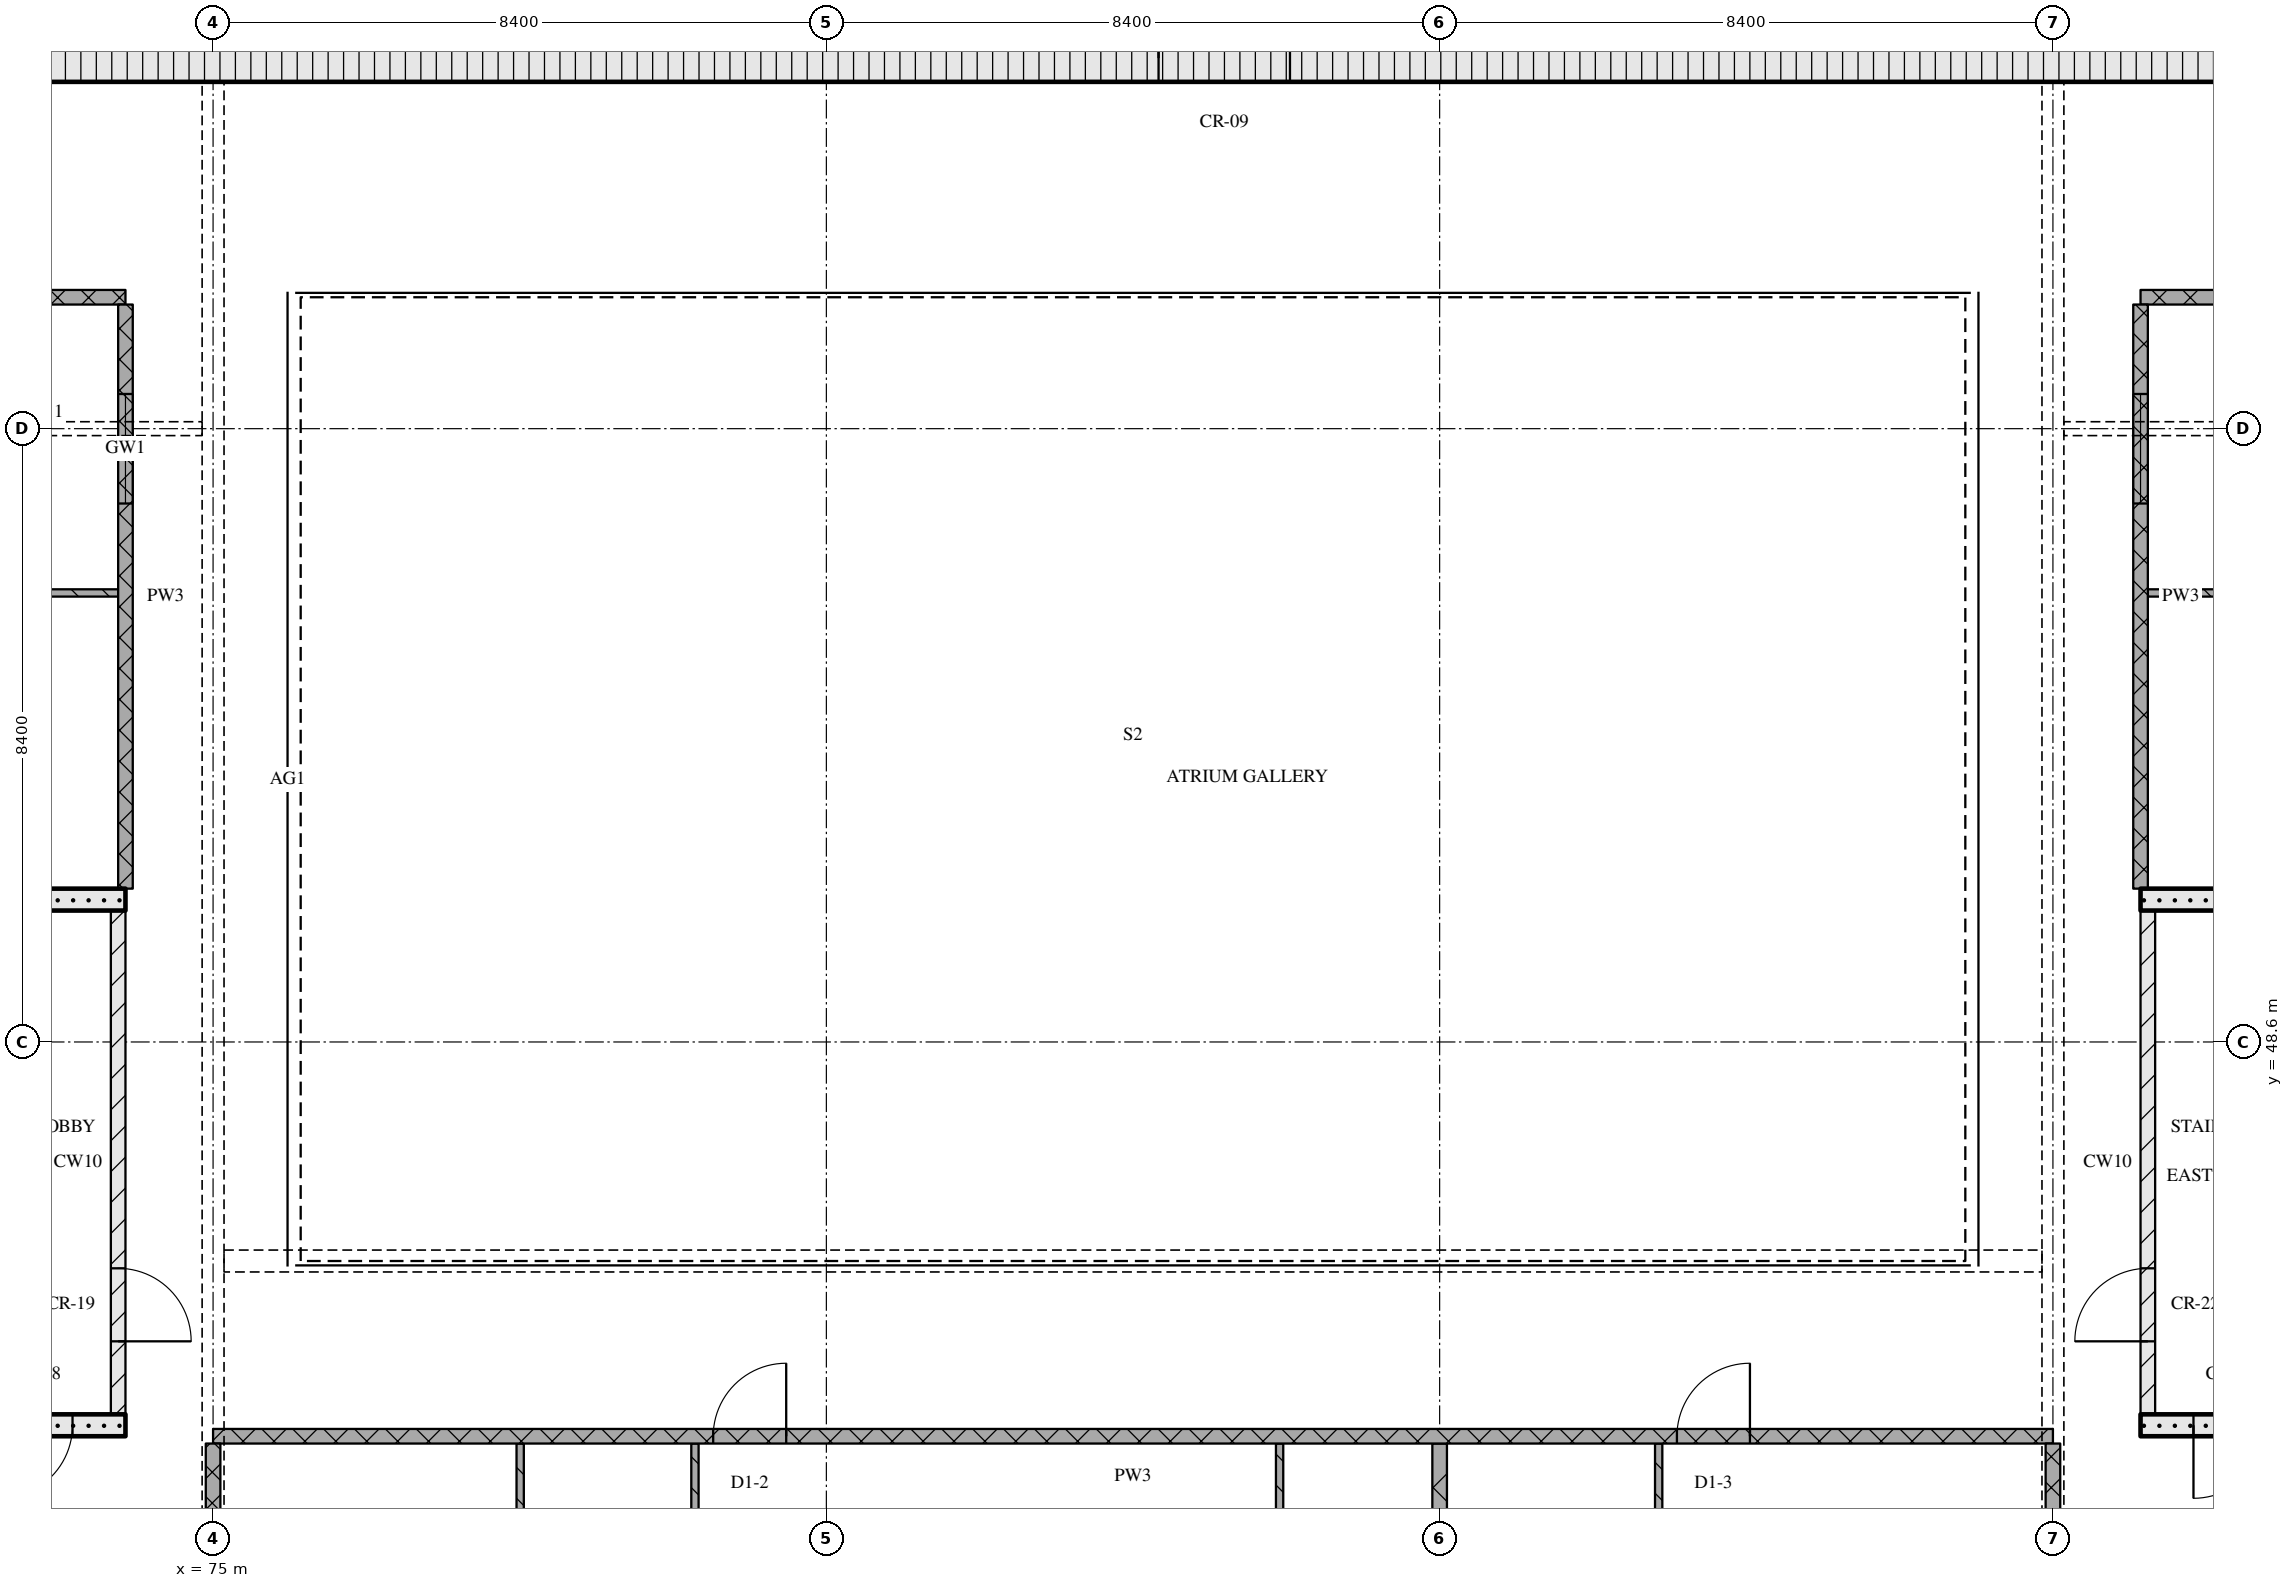
"""IFC4 building model, lengths in metres.
Left out: names, types, materials, properties, quantities, classifications, styles, units other than length and angle.
Written with IfcOpenShell. Run it as: python <this file> out.ifc"""

import sys

from ifc_helpers import new_model, si_unit, direction, frame, frame_2d, origin, place, context, subcontext, project, spatial, rectangle, extrude, element, fill, save


model = new_model("IFC4")
c1 = context("Model", 3, precision=1e-05, world=origin(), true_north=direction((0.0, 1.0)))
c2 = subcontext(c1, "Body", "Model", "MODEL_VIEW")
j1 = project(units=[si_unit("LENGTHUNIT", "METRE"), si_unit("PLANEANGLEUNIT", "RADIAN")], contexts=[c1])
p1 = place(None, origin())
s1 = spatial("IfcSite", under=j1, at=p1, CompositionType="ELEMENT")
p2 = place(p1, origin())
s2 = spatial("IfcBuilding", under=s1, at=p2, CompositionType="ELEMENT")
p3 = place(p2, frame((0.0, 0.0, 209.1)))
s3 = spatial("IfcBuildingStorey", under=s2, at=p3, CompositionType="ELEMENT", Elevation=209.1)
p4 = place(p3, frame((67.15, 62.075, 0.0), z_axis=(0.0, 0.0, 1.0), x_axis=(1.0, 0.0, 0.0)))
e1 = element("IfcWall", 1, at=p4, inside=s3, PredefinedType="SOLIDWALL", context=c2, shape_type="SweptSolid", body=[
    extrude(rectangle(XDim=40.9, YDim=0.65, at=frame_2d((20.45, 0.0))), origin(), (0.0, 0.0, 1.0), 3.32),
])
p5 = place(p4, frame((20.8, 0.0, 0.0)))
e2 = element("IfcOpeningElement", 2, at=p5, cuts=e1, PredefinedType="OPENING", context=c2, shape_type="SweptSolid", body=[
    extrude(rectangle(XDim=1.8, YDim=2.1, at=frame_2d((0.9, 1.05))), frame((0.0, 0.335, 0.0), z_axis=(0.0, -1.0, 0.0), x_axis=(1.0, 0.0, 0.0)), (0.0, 0.0, 1.0), 0.67),
])
p6 = place(p3, frame((68.2, 43.35, 0.0), z_axis=(0.0, 0.0, 1.0), x_axis=(1.0, 0.0, 0.0)))
e3 = element("IfcWall", 3, at=p6, inside=s3, PredefinedType="SOLIDWALL", context=c2, shape_type="SweptSolid", body=[
    extrude(rectangle(XDim=5.6, YDim=0.3, at=frame_2d((2.8, 0.0))), origin(), (0.0, 0.0, 1.0), 3.32),
])
p7 = place(p6, frame((3.875, 0.0, 0.0)))
e4 = element("IfcOpeningElement", 4, at=p7, cuts=e3, PredefinedType="OPENING", context=c2, shape_type="SweptSolid", body=[
    extrude(rectangle(XDim=1.0, YDim=2.1, at=frame_2d((0.5, 1.05))), frame((0.0, 0.16, 0.0), z_axis=(0.0, -1.0, 0.0), x_axis=(1.0, 0.0, 0.0)), (0.0, 0.0, 1.0), 0.32),
])
p8 = place(p3, frame((73.7, 43.5, 0.0), z_axis=(0.0, 0.0, 1.0), x_axis=(0.0, 1.0, 0.0)))
e5 = element("IfcWall", 5, at=p8, inside=s3, PredefinedType="PARTITIONING", context=c2, shape_type="SweptSolid", body=[
    extrude(rectangle(XDim=6.9, YDim=0.2, at=frame_2d((3.45, 0.0))), origin(), (0.0, 0.0, 1.0), 3.32),
])
p9 = place(p8, frame((1.0, 0.0, 0.0)))
e6 = element("IfcOpeningElement", 6, at=p9, cuts=e5, PredefinedType="OPENING", context=c2, shape_type="SweptSolid", body=[
    extrude(rectangle(XDim=1.0, YDim=2.1, at=frame_2d((0.5, 1.05))), frame((0.0, 0.11, 0.0), z_axis=(0.0, -1.0, 0.0), x_axis=(1.0, 0.0, 0.0)), (0.0, 0.0, 1.0), 0.22),
])
p10 = place(p3, frame((68.2, 50.55, 0.0), z_axis=(0.0, 0.0, 1.0), x_axis=(1.0, 0.0, 0.0)))
e7 = element("IfcWall", 7, at=p10, inside=s3, PredefinedType="SOLIDWALL", context=c2, shape_type="SweptSolid", body=[
    extrude(rectangle(XDim=5.6, YDim=0.3, at=frame_2d((2.8, 0.0))), origin(), (0.0, 0.0, 1.0), 3.32),
])
p11 = place(p3, frame((101.4, 43.35, 0.0), z_axis=(0.0, 0.0, 1.0), x_axis=(1.0, 0.0, 0.0)))
e8 = element("IfcWall", 8, at=p11, inside=s3, PredefinedType="SOLIDWALL", context=c2, shape_type="SweptSolid", body=[
    extrude(rectangle(XDim=5.6, YDim=0.3, at=frame_2d((2.8, 0.0))), origin(), (0.0, 0.0, 1.0), 3.32),
])
p12 = place(p11, frame((0.725, 0.0, 0.0)))
e9 = element("IfcOpeningElement", 9, at=p12, cuts=e8, PredefinedType="OPENING", context=c2, shape_type="SweptSolid", body=[
    extrude(rectangle(XDim=1.0, YDim=2.1, at=frame_2d((0.5, 1.05))), frame((0.0, 0.16, 0.0), z_axis=(0.0, -1.0, 0.0), x_axis=(1.0, 0.0, 0.0)), (0.0, 0.0, 1.0), 0.32),
])
p13 = place(p3, frame((101.5, 43.5, 0.0), z_axis=(0.0, 0.0, 1.0), x_axis=(0.0, 1.0, 0.0)))
e10 = element("IfcWall", 10, at=p13, inside=s3, PredefinedType="PARTITIONING", context=c2, shape_type="SweptSolid", body=[
    extrude(rectangle(XDim=6.9, YDim=0.2, at=frame_2d((3.45, 0.0))), origin(), (0.0, 0.0, 1.0), 3.32),
])
p14 = place(p13, frame((1.0, 0.0, 0.0)))
e11 = element("IfcOpeningElement", 11, at=p14, cuts=e10, PredefinedType="OPENING", context=c2, shape_type="SweptSolid", body=[
    extrude(rectangle(XDim=1.0, YDim=2.1, at=frame_2d((0.5, 1.05))), frame((0.0, 0.11, 0.0), z_axis=(0.0, -1.0, 0.0), x_axis=(1.0, 0.0, 0.0)), (0.0, 0.0, 1.0), 0.22),
])
p15 = place(p3, frame((101.4, 50.55, 0.0), z_axis=(0.0, 0.0, 1.0), x_axis=(1.0, 0.0, 0.0)))
e12 = element("IfcWall", 12, at=p15, inside=s3, PredefinedType="SOLIDWALL", context=c2, shape_type="SweptSolid", body=[
    extrude(rectangle(XDim=5.6, YDim=0.3, at=frame_2d((2.8, 0.0))), origin(), (0.0, 0.0, 1.0), 3.32),
])
p16 = place(p3, frame((100.2, 43.2, 0.0), z_axis=(0.0, 0.0, 1.0), x_axis=(-1.0, 0.0, 0.0)))
e13 = element("IfcWall", 13, at=p16, inside=s3, PredefinedType="PARTITIONING", context=c2, shape_type="SweptSolid", body=[
    extrude(rectangle(XDim=25.2, YDim=0.2, at=frame_2d((12.6, 0.0))), origin(), (0.0, 0.0, 1.0), 3.32),
])
p17 = place(p16, frame((4.15, 0.0, 0.0)))
e14 = element("IfcOpeningElement", 14, at=p17, cuts=e13, PredefinedType="OPENING", context=c2, shape_type="SweptSolid", body=[
    extrude(rectangle(XDim=1.0, YDim=2.1, at=frame_2d((0.5, 1.05))), frame((0.0, 0.11, 0.0), z_axis=(0.0, -1.0, 0.0), x_axis=(1.0, 0.0, 0.0)), (0.0, 0.0, 1.0), 0.22),
])
p18 = place(p16, frame((17.35, 0.0, 0.0)))
e15 = element("IfcOpeningElement", 15, at=p18, cuts=e13, PredefinedType="OPENING", context=c2, shape_type="SweptSolid", body=[
    extrude(rectangle(XDim=1.0, YDim=2.1, at=frame_2d((0.5, 1.05))), frame((0.0, 0.11, 0.0), z_axis=(0.0, -1.0, 0.0), x_axis=(1.0, 0.0, 0.0)), (0.0, 0.0, 1.0), 0.22),
])
p19 = place(p3, frame((69.3, 54.75, 0.0), z_axis=(0.0, 0.0, 1.0), x_axis=(1.0, 0.0, 0.0)))
e16 = element("IfcWall", 16, at=p19, inside=s3, PredefinedType="PARTITIONING", context=c2, shape_type="SweptSolid", body=[
    extrude(rectangle(XDim=4.4, YDim=0.1, at=frame_2d((2.2, 0.0))), origin(), (0.0, 0.0, 1.0), 3.32),
])
p20 = place(p3, frame((101.5, 54.75, 0.0), z_axis=(0.0, 0.0, 1.0), x_axis=(1.0, 0.0, 0.0)))
e17 = element("IfcWall", 17, at=p20, inside=s3, PredefinedType="PARTITIONING", context=c2, shape_type="SweptSolid", body=[
    extrude(rectangle(XDim=6.8, YDim=0.1, at=frame_2d((3.4, 0.0))), origin(), (0.0, 0.0, 1.0), 3.32),
])
p21 = place(p20, frame((2.9, 0.0, 0.0)))
e18 = element("IfcOpeningElement", 18, at=p21, cuts=e17, PredefinedType="OPENING", context=c2, shape_type="SweptSolid", body=[
    extrude(rectangle(XDim=0.9, YDim=2.1, at=frame_2d((0.45, 1.05))), frame((0.0, 0.06, 0.0), z_axis=(0.0, -1.0, 0.0), x_axis=(1.0, 0.0, 0.0)), (0.0, 0.0, 1.0), 0.12),
])
for number, where, z_axis, x_axis in (
    (19, (63.0, 58.8, 0.0), (0.0, 0.0, 1.0), (1.0, 0.0, 0.0)),
    (20, (101.4, 58.8, 0.0), (0.0, 0.0, 1.0), (1.0, 0.0, 0.0)),
):
    element("IfcWall", number, at=place(p3, frame(where, z_axis=z_axis, x_axis=x_axis)), inside=s3, PredefinedType="PARTITIONING", context=c2, shape_type="SweptSolid", body=[
        extrude(rectangle(XDim=10.8, YDim=0.2, at=frame_2d((5.4, 0.0))), origin(), (0.0, 0.0, 1.0), 3.32),
    ])
p22 = place(p3, frame((73.8, 58.7, 0.0), z_axis=(0.0, 0.0, 1.0), x_axis=(0.0, -1.0, 0.0)))
e21 = element("IfcWall", 21, at=p22, inside=s3, PredefinedType="PARTITIONING", context=c2, shape_type="SweptSolid", body=[
    extrude(rectangle(XDim=8.0, YDim=0.2, at=frame_2d((4.0, 0.0))), origin(), (0.0, 0.0, 1.0), 3.32),
])
p23 = place(p22, frame((1.225, 0.0, 0.9)))
e22 = element("IfcOpeningElement", 22, at=p23, cuts=e21, PredefinedType="OPENING", context=c2, shape_type="SweptSolid", body=[
    extrude(rectangle(XDim=1.5, YDim=1.5, at=frame_2d((0.75, 0.75))), frame((0.0, 0.11, 0.0), z_axis=(0.0, -1.0, 0.0), x_axis=(1.0, 0.0, 0.0)), (0.0, 0.0, 1.0), 0.22),
])
p24 = place(p3, frame((75.0, 43.1, 0.0), z_axis=(0.0, 0.0, 1.0), x_axis=(0.0, -1.0, 0.0)))
e23 = element("IfcWall", 23, at=p24, inside=s3, PredefinedType="PARTITIONING", context=c2, shape_type="SweptSolid", body=[
    extrude(rectangle(XDim=2.2, YDim=0.2, at=frame_2d((1.1, 0.0))), origin(), (0.0, 0.0, 1.0), 2.53),
])
p25 = place(p3, frame((79.206, 43.1, 0.0), z_axis=(0.0, 0.0, 1.0), x_axis=(0.0, -1.0, 0.0)))
e24 = element("IfcWall", 24, at=p25, inside=s3, PredefinedType="PARTITIONING", context=c2, shape_type="SweptSolid", body=[
    extrude(rectangle(XDim=6.15, YDim=0.1, at=frame_2d((3.075, 0.0))), origin(), (0.0, 0.0, 1.0), 3.32),
])
p26 = place(p3, frame((81.6, 36.95, 0.0), z_axis=(0.0, 0.0, 1.0), x_axis=(0.0, 1.0, 0.0)))
e25 = element("IfcWall", 25, at=p26, inside=s3, PredefinedType="PARTITIONING", context=c2, shape_type="SweptSolid", body=[
    extrude(rectangle(XDim=6.15, YDim=0.1, at=frame_2d((3.075, 0.0))), origin(), (0.0, 0.0, 1.0), 3.32),
])
p27 = place(p26, frame((2.65, 0.0, 0.0)))
e26 = element("IfcOpeningElement", 26, at=p27, cuts=e25, PredefinedType="OPENING", context=c2, shape_type="SweptSolid", body=[
    extrude(rectangle(XDim=0.9, YDim=2.1, at=frame_2d((0.45, 1.05))), frame((0.0, 0.06, 0.0), z_axis=(0.0, -1.0, 0.0), x_axis=(1.0, 0.0, 0.0)), (0.0, 0.0, 1.0), 0.12),
])
p28 = place(p3, frame((89.608, 43.1, 0.0), z_axis=(0.0, 0.0, 1.0), x_axis=(0.0, -1.0, 0.0)))
e27 = element("IfcWall", 27, at=p28, inside=s3, PredefinedType="PARTITIONING", context=c2, shape_type="SweptSolid", body=[
    extrude(rectangle(XDim=6.15, YDim=0.1, at=frame_2d((3.075, 0.0))), origin(), (0.0, 0.0, 1.0), 3.32),
])
p29 = place(p3, frame((91.8, 43.1, 0.0), z_axis=(0.0, 0.0, 1.0), x_axis=(0.0, -1.0, 0.0)))
e28 = element("IfcWall", 28, at=p29, inside=s3, PredefinedType="PARTITIONING", context=c2, shape_type="SweptSolid", body=[
    extrude(rectangle(XDim=2.58, YDim=0.2, at=frame_2d((1.29, 0.0))), origin(), (0.0, 0.0, 1.0), 3.32),
])
p30 = place(p3, frame((94.8, 43.1, 0.0), z_axis=(0.0, 0.0, 1.0), x_axis=(0.0, -1.0, 0.0)))
e29 = element("IfcWall", 29, at=p30, inside=s3, PredefinedType="PARTITIONING", context=c2, shape_type="SweptSolid", body=[
    extrude(rectangle(XDim=5.55, YDim=0.1, at=frame_2d((2.775, 0.0))), origin(), (0.0, 0.0, 1.0), 3.32),
])
p31 = place(p3, frame((100.2, 43.1, 0.0), z_axis=(0.0, 0.0, 1.0), x_axis=(0.0, -1.0, 0.0)))
e30 = element("IfcWall", 30, at=p31, inside=s3, PredefinedType="PARTITIONING", context=c2, shape_type="SweptSolid", body=[
    extrude(rectangle(XDim=2.2, YDim=0.2, at=frame_2d((1.1, 0.0))), origin(), (0.0, 0.0, 1.0), 2.53),
])
p32 = place(p3, frame((101.4, 58.7, 0.0), z_axis=(0.0, 0.0, 1.0), x_axis=(0.0, -1.0, 0.0)))
e31 = element("IfcWall", 31, at=p32, inside=s3, PredefinedType="PARTITIONING", context=c2, shape_type="SweptSolid", body=[
    extrude(rectangle(XDim=8.0, YDim=0.2, at=frame_2d((4.0, 0.0))), origin(), (0.0, 0.0, 1.0), 3.32),
])
p33 = place(p32, frame((1.225, 0.0, 0.9)))
e32 = element("IfcOpeningElement", 32, at=p33, cuts=e31, PredefinedType="OPENING", context=c2, shape_type="SweptSolid", body=[
    extrude(rectangle(XDim=1.5, YDim=1.5, at=frame_2d((0.75, 0.75))), frame((0.0, 0.11, 0.0), z_axis=(0.0, -1.0, 0.0), x_axis=(1.0, 0.0, 0.0)), (0.0, 0.0, 1.0), 0.22),
])
p34 = place(p5, origin())
e33 = element("IfcDoor", 33, at=p34, inside=s3, OperationType="DOUBLE_DOOR_SINGLE_SWING", PredefinedType="DOOR", context=c2, shape_type="SweptSolid", body=[
    extrude(rectangle(XDim=1.8, YDim=2.1, at=frame_2d((0.9, 1.05))), frame((0.0, 0.025, 0.0), z_axis=(0.0, -1.0, 0.0), x_axis=(1.0, 0.0, 0.0)), (0.0, 0.0, 1.0), 0.05),
])
fill(e2, e33)
p35 = place(p7, origin())
e34 = element("IfcDoor", 34, at=p35, inside=s3, OperationType="SINGLE_SWING_RIGHT", PredefinedType="DOOR", context=c2, shape_type="SweptSolid", body=[
    extrude(rectangle(XDim=1.0, YDim=2.1, at=frame_2d((0.5, 1.05))), frame((0.0, 0.025, 0.0), z_axis=(0.0, -1.0, 0.0), x_axis=(1.0, 0.0, 0.0)), (0.0, 0.0, 1.0), 0.05),
])
fill(e4, e34)
p36 = place(p9, origin())
e35 = element("IfcDoor", 35, at=p36, inside=s3, OperationType="SINGLE_SWING_RIGHT", PredefinedType="DOOR", context=c2, shape_type="SweptSolid", body=[
    extrude(rectangle(XDim=1.0, YDim=2.1, at=frame_2d((0.5, 1.05))), frame((0.0, 0.025, 0.0), z_axis=(0.0, -1.0, 0.0), x_axis=(1.0, 0.0, 0.0)), (0.0, 0.0, 1.0), 0.05),
])
fill(e6, e35)
p37 = place(p12, origin())
e36 = element("IfcDoor", 36, at=p37, inside=s3, OperationType="SINGLE_SWING_RIGHT", PredefinedType="DOOR", context=c2, shape_type="SweptSolid", body=[
    extrude(rectangle(XDim=1.0, YDim=2.1, at=frame_2d((0.5, 1.05))), frame((0.0, 0.025, 0.0), z_axis=(0.0, -1.0, 0.0), x_axis=(1.0, 0.0, 0.0)), (0.0, 0.0, 1.0), 0.05),
])
fill(e9, e36)
p38 = place(p14, origin())
e37 = element("IfcDoor", 37, at=p38, inside=s3, OperationType="SINGLE_SWING_LEFT", PredefinedType="DOOR", context=c2, shape_type="SweptSolid", body=[
    extrude(rectangle(XDim=1.0, YDim=2.1, at=frame_2d((0.5, 1.05))), frame((0.0, 0.025, 0.0), z_axis=(0.0, -1.0, 0.0), x_axis=(1.0, 0.0, 0.0)), (0.0, 0.0, 1.0), 0.05),
])
fill(e11, e37)
p39 = place(p17, origin())
e38 = element("IfcDoor", 38, at=p39, inside=s3, OperationType="SINGLE_SWING_RIGHT", PredefinedType="DOOR", context=c2, shape_type="SweptSolid", body=[
    extrude(rectangle(XDim=1.0, YDim=2.1, at=frame_2d((0.5, 1.05))), frame((0.0, 0.025, 0.0), z_axis=(0.0, -1.0, 0.0), x_axis=(1.0, 0.0, 0.0)), (0.0, 0.0, 1.0), 0.05),
])
fill(e14, e38)
p40 = place(p18, origin())
e39 = element("IfcDoor", 39, at=p40, inside=s3, OperationType="SINGLE_SWING_RIGHT", PredefinedType="DOOR", context=c2, shape_type="SweptSolid", body=[
    extrude(rectangle(XDim=1.0, YDim=2.1, at=frame_2d((0.5, 1.05))), frame((0.0, 0.025, 0.0), z_axis=(0.0, -1.0, 0.0), x_axis=(1.0, 0.0, 0.0)), (0.0, 0.0, 1.0), 0.05),
])
fill(e15, e39)
p41 = place(p23, origin())
e40 = element("IfcWindow", 40, at=p41, inside=s3, PartitioningType="SINGLE_PANEL", PredefinedType="WINDOW", context=c2, shape_type="SweptSolid", body=[
    extrude(rectangle(XDim=1.5, YDim=1.5, at=frame_2d((0.75, 0.75))), frame((0.0, 0.03, 0.0), z_axis=(0.0, -1.0, 0.0), x_axis=(1.0, 0.0, 0.0)), (0.0, 0.0, 1.0), 0.06),
])
fill(e22, e40)
p42 = place(p33, origin())
e41 = element("IfcWindow", 41, at=p42, inside=s3, PartitioningType="SINGLE_PANEL", PredefinedType="WINDOW", context=c2, shape_type="SweptSolid", body=[
    extrude(rectangle(XDim=1.5, YDim=1.5, at=frame_2d((0.75, 0.75))), frame((0.0, 0.03, 0.0), z_axis=(0.0, -1.0, 0.0), x_axis=(1.0, 0.0, 0.0)), (0.0, 0.0, 1.0), 0.06),
])
fill(e32, e41)
save(model, sys.argv[1])
